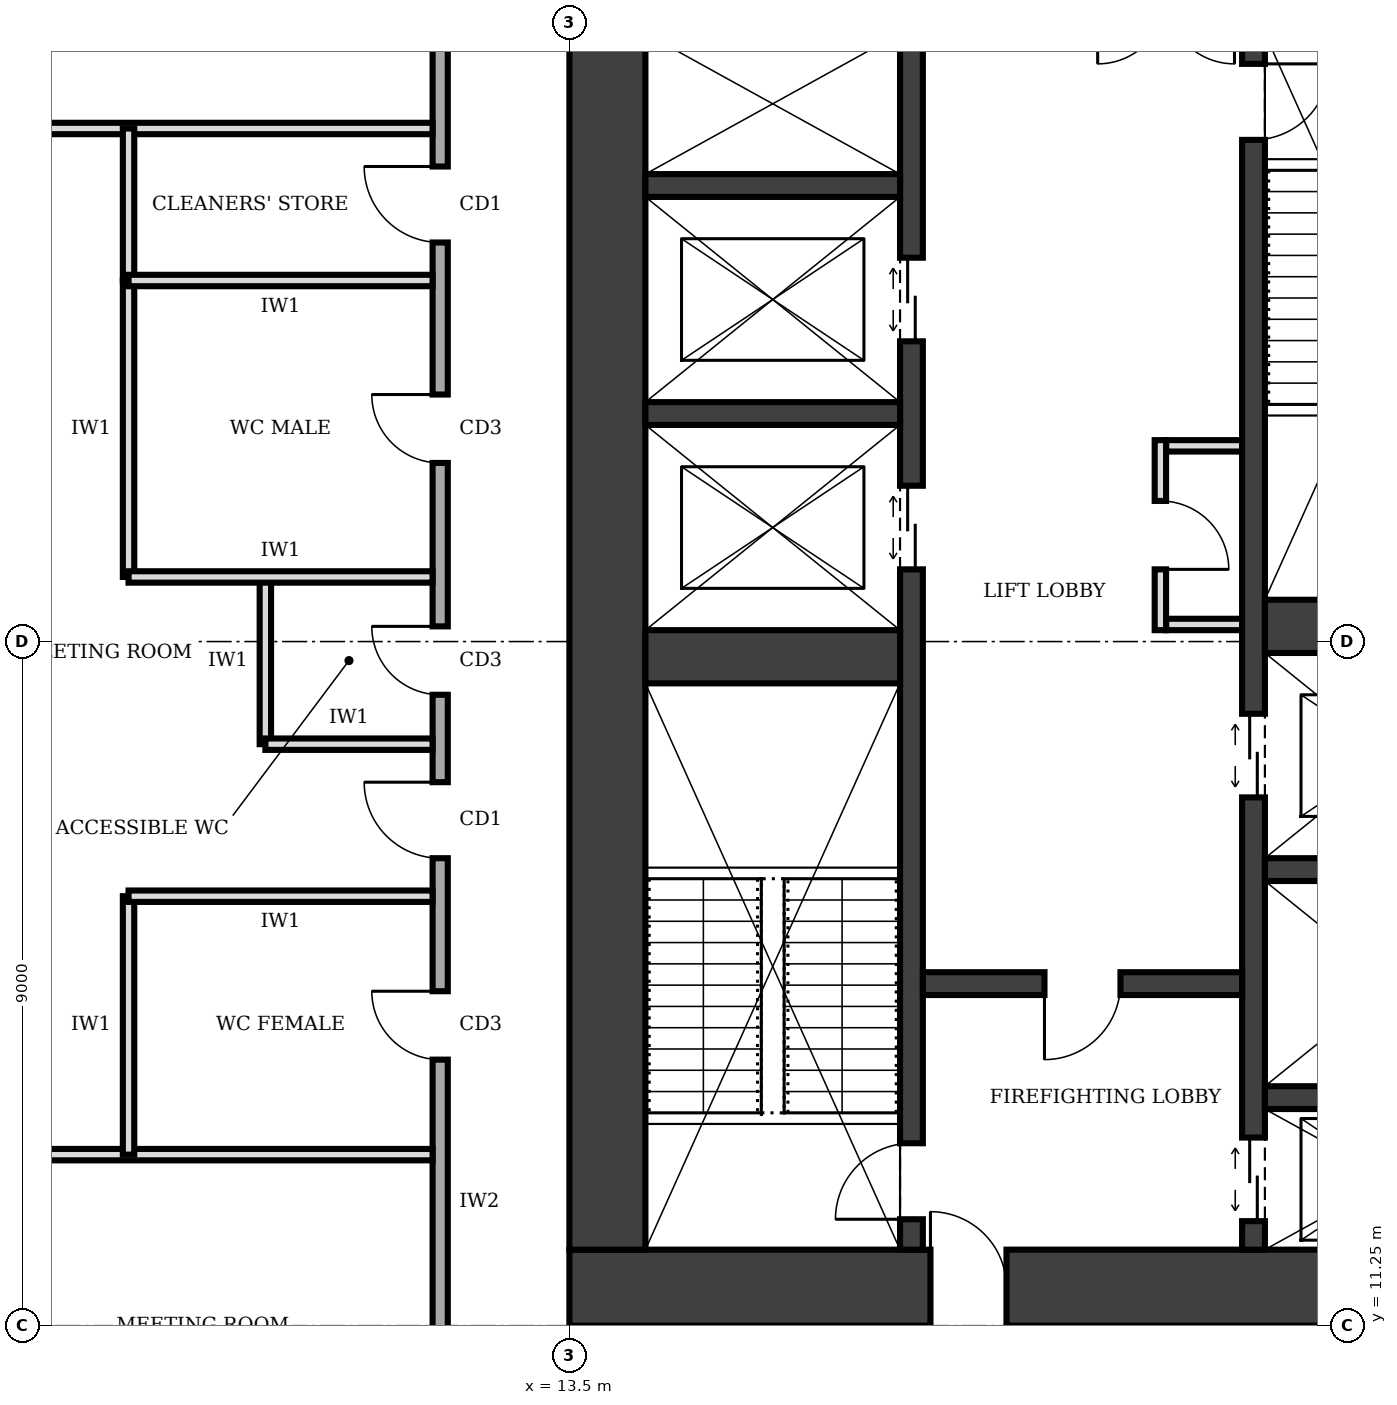
"""IFC4 building model, lengths in metres.
Left out: names, types, materials, properties, quantities, classifications, styles, units other than length and angle.
Written with IfcOpenShell. Run it as: python <this file> out.ifc"""

import sys

from ifc_helpers import new_model, si_unit, direction, frame, frame_2d, origin, place, context, subcontext, project, spatial, rectangle, extrude, element, fill, save


model = new_model("IFC4")
c1 = context("Model", 3, precision=1e-05, world=origin(), true_north=direction((0.0, 1.0)))
c2 = subcontext(c1, "Body", "Model", "MODEL_VIEW")
j1 = project(units=[si_unit("LENGTHUNIT", "METRE"), si_unit("PLANEANGLEUNIT", "RADIAN")], contexts=[c1])
p1 = place(None, origin())
s1 = spatial("IfcSite", under=j1, at=p1, CompositionType="ELEMENT")
p2 = place(p1, origin())
s2 = spatial("IfcBuilding", under=s1, at=p2, CompositionType="ELEMENT")
p3 = place(p2, frame((0.0, 0.0, 89.0)))
s3 = spatial("IfcBuildingStorey", under=s2, at=p3, CompositionType="ELEMENT", Elevation=89.0)
p4 = place(p3, frame((13.5, 11.75, 0.0), z_axis=(0.0, 0.0, 1.0), x_axis=(1.0, 0.0, 0.0)))
e1 = element("IfcWall", 1, at=p4, inside=s3, PredefinedType="SHEAR", context=c2, shape_type="SweptSolid", body=[
    extrude(rectangle(XDim=13.5, YDim=1.0, at=frame_2d((6.75, 0.0))), origin(), (0.0, 0.0, 1.0), 4.0),
])
p5 = place(p4, frame((4.75, 0.0, 0.0)))
e2 = element("IfcOpeningElement", 2, at=p5, cuts=e1, PredefinedType="OPENING", context=c2, shape_type="SweptSolid", body=[
    extrude(rectangle(XDim=1.0, YDim=2.1, at=frame_2d((0.5, 1.05))), frame((0.0, 0.51, 0.0), z_axis=(0.0, -1.0, 0.0), x_axis=(1.0, 0.0, 0.0)), (0.0, 0.0, 1.0), 1.02),
])
p6 = place(p3, frame((14.0, 28.25, 0.0), z_axis=(0.0, 0.0, 1.0), x_axis=(0.0, -1.0, 0.0)))
e3 = element("IfcWall", 3, at=p6, inside=s3, PredefinedType="SHEAR", context=c2, shape_type="SweptSolid", body=[
    extrude(rectangle(XDim=16.0, YDim=1.0, at=frame_2d((8.0, 0.0))), origin(), (0.0, 0.0, 1.0), 4.0),
])
p7 = place(p3, frame((18.0, 12.25, 0.0), z_axis=(0.0, 0.0, 1.0), x_axis=(0.0, 1.0, 0.0)))
e4 = element("IfcWall", 4, at=p7, inside=s3, PredefinedType="SHEAR", context=c2, shape_type="SweptSolid", body=[
    extrude(rectangle(XDim=16.0, YDim=0.3, at=frame_2d((8.0, 0.0))), origin(), (0.0, 0.0, 1.0), 4.0),
])
p8 = place(p7, frame((0.4, 0.0, 0.0)))
e5 = element("IfcOpeningElement", 5, at=p8, cuts=e4, PredefinedType="OPENING", context=c2, shape_type="SweptSolid", body=[
    extrude(rectangle(XDim=1.0, YDim=2.1, at=frame_2d((0.5, 1.05))), frame((0.0, 0.16, 0.0), z_axis=(0.0, -1.0, 0.0), x_axis=(1.0, 0.0, 0.0)), (0.0, 0.0, 1.0), 0.32),
])
p9 = place(p7, frame((8.95, 0.0, 0.0)))
e6 = element("IfcOpeningElement", 6, at=p9, cuts=e4, PredefinedType="OPENING", context=c2, shape_type="SweptSolid", body=[
    extrude(rectangle(XDim=1.1, YDim=2.1, at=frame_2d((0.55, 1.05))), frame((0.0, 0.16, 0.0), z_axis=(0.0, -1.0, 0.0), x_axis=(1.0, 0.0, 0.0)), (0.0, 0.0, 1.0), 0.32),
])
p10 = place(p7, frame((11.95, 0.0, 0.0)))
e7 = element("IfcOpeningElement", 7, at=p10, cuts=e4, PredefinedType="OPENING", context=c2, shape_type="SweptSolid", body=[
    extrude(rectangle(XDim=1.1, YDim=2.1, at=frame_2d((0.55, 1.05))), frame((0.0, 0.16, 0.0), z_axis=(0.0, -1.0, 0.0), x_axis=(1.0, 0.0, 0.0)), (0.0, 0.0, 1.0), 0.32),
])
p11 = place(p3, frame((22.5, 12.25, 0.0), z_axis=(0.0, 0.0, 1.0), x_axis=(0.0, 1.0, 0.0)))
e8 = element("IfcWall", 8, at=p11, inside=s3, PredefinedType="SHEAR", context=c2, shape_type="SweptSolid", body=[
    extrude(rectangle(XDim=16.0, YDim=0.3, at=frame_2d((8.0, 0.0))), origin(), (0.0, 0.0, 1.0), 4.0),
])
p12 = place(p11, frame((14.6, 0.0, 0.0)))
e9 = element("IfcOpeningElement", 9, at=p12, cuts=e8, PredefinedType="OPENING", context=c2, shape_type="SweptSolid", body=[
    extrude(rectangle(XDim=1.0, YDim=2.1, at=frame_2d((0.5, 1.05))), frame((0.0, 0.16, 0.0), z_axis=(0.0, -1.0, 0.0), x_axis=(1.0, 0.0, 0.0)), (0.0, 0.0, 1.0), 0.32),
])
p13 = place(p11, frame((0.375, 0.0, 0.0)))
e10 = element("IfcOpeningElement", 10, at=p13, cuts=e8, PredefinedType="OPENING", context=c2, shape_type="SweptSolid", body=[
    extrude(rectangle(XDim=1.1, YDim=2.1, at=frame_2d((0.55, 1.05))), frame((0.0, 0.16, 0.0), z_axis=(0.0, -1.0, 0.0), x_axis=(1.0, 0.0, 0.0)), (0.0, 0.0, 1.0), 0.32),
])
p14 = place(p11, frame((5.95, 0.0, 0.0)))
e11 = element("IfcOpeningElement", 11, at=p14, cuts=e8, PredefinedType="OPENING", context=c2, shape_type="SweptSolid", body=[
    extrude(rectangle(XDim=1.1, YDim=2.1, at=frame_2d((0.55, 1.05))), frame((0.0, 0.16, 0.0), z_axis=(0.0, -1.0, 0.0), x_axis=(1.0, 0.0, 0.0)), (0.0, 0.0, 1.0), 0.32),
])
p15 = place(p3, frame((14.5, 20.05, 0.0), z_axis=(0.0, 0.0, 1.0), x_axis=(1.0, 0.0, 0.0)))
e12 = element("IfcWall", 12, at=p15, inside=s3, PredefinedType="SHEAR", context=c2, shape_type="SweptSolid", body=[
    extrude(rectangle(XDim=3.35, YDim=0.7, at=frame_2d((1.675, 0.0))), origin(), (0.0, 0.0, 1.0), 4.0),
])
p16 = place(p3, frame((18.15, 15.75, 0.0), z_axis=(0.0, 0.0, 1.0), x_axis=(1.0, 0.0, 0.0)))
e13 = element("IfcWall", 13, at=p16, inside=s3, PredefinedType="SHEAR", context=c2, shape_type="SweptSolid", body=[
    extrude(rectangle(XDim=4.2, YDim=0.3, at=frame_2d((2.1, 0.0))), origin(), (0.0, 0.0, 1.0), 4.0),
])
p17 = place(p16, frame((1.6, 0.0, 0.0)))
e14 = element("IfcOpeningElement", 14, at=p17, cuts=e13, PredefinedType="OPENING", context=c2, shape_type="SweptSolid", body=[
    extrude(rectangle(XDim=1.0, YDim=2.1, at=frame_2d((0.5, 1.05))), frame((0.0, 0.16, 0.0), z_axis=(0.0, -1.0, 0.0), x_axis=(1.0, 0.0, 0.0)), (0.0, 0.0, 1.0), 0.32),
])
for number, where, z_axis, x_axis in (
    (15, (22.65, 14.25, 0.0), (0.0, 0.0, 1.0), (1.0, 0.0, 0.0)),
    (16, (22.65, 17.25, 0.0), (0.0, 0.0, 1.0), (1.0, 0.0, 0.0)),
):
    element("IfcWall", number, at=place(p3, frame(where, z_axis=z_axis, x_axis=x_axis)), inside=s3, PredefinedType="SHEAR", context=c2, shape_type="SweptSolid", body=[
        extrude(rectangle(XDim=3.35, YDim=0.3, at=frame_2d((1.675, 0.0))), origin(), (0.0, 0.0, 1.0), 4.0),
    ])
p18 = place(p3, frame((22.65, 20.45, 0.0), z_axis=(0.0, 0.0, 1.0), x_axis=(1.0, 0.0, 0.0)))
e17 = element("IfcWall", 17, at=p18, inside=s3, PredefinedType="SHEAR", context=c2, shape_type="SweptSolid", body=[
    extrude(rectangle(XDim=3.35, YDim=0.7, at=frame_2d((1.675, 0.0))), origin(), (0.0, 0.0, 1.0), 4.0),
])
for number, where, z_axis, x_axis in (
    (18, (14.5, 23.25, 0.0), (0.0, 0.0, 1.0), (1.0, 0.0, 0.0)),
    (19, (14.5, 26.25, 0.0), (0.0, 0.0, 1.0), (1.0, 0.0, 0.0)),
):
    element("IfcWall", number, at=place(p3, frame(where, z_axis=z_axis, x_axis=x_axis)), inside=s3, PredefinedType="SHEAR", context=c2, shape_type="SweptSolid", body=[
        extrude(rectangle(XDim=3.35, YDim=0.3, at=frame_2d((1.675, 0.0))), origin(), (0.0, 0.0, 1.0), 4.0),
    ])
p19 = place(p3, frame((21.275, 20.4, 0.0), z_axis=(0.0, 0.0, 1.0), x_axis=(0.0, 1.0, 0.0)))
e20 = element("IfcWall", 20, at=p19, inside=s3, PredefinedType="PARTITIONING", context=c2, shape_type="SweptSolid", body=[
    extrude(rectangle(XDim=2.5, YDim=0.15, at=frame_2d((1.25, 0.0))), origin(), (0.0, 0.0, 1.0), 3.75),
])
p20 = place(p19, frame((0.8, 0.0, 0.0)))
e21 = element("IfcOpeningElement", 21, at=p20, cuts=e20, PredefinedType="OPENING", context=c2, shape_type="SweptSolid", body=[
    extrude(rectangle(XDim=0.9, YDim=2.1, at=frame_2d((0.45, 1.05))), frame((0.0, 0.085, 0.0), z_axis=(0.0, -1.0, 0.0), x_axis=(1.0, 0.0, 0.0)), (0.0, 0.0, 1.0), 0.17),
])
for number, where, z_axis, x_axis in (
    (22, (21.35, 20.475, 0.0), (0.0, 0.0, 1.0), (1.0, 0.0, 0.0)),
    (23, (21.35, 22.825, 0.0), (0.0, 0.0, 1.0), (1.0, 0.0, 0.0)),
):
    element("IfcWall", number, at=place(p3, frame(where, z_axis=z_axis, x_axis=x_axis)), inside=s3, PredefinedType="PARTITIONING", context=c2, shape_type="SweptSolid", body=[
        extrude(rectangle(XDim=1.0, YDim=0.15, at=frame_2d((0.5, 0.0))), origin(), (0.0, 0.0, 1.0), 3.75),
    ])
p21 = place(p3, frame((11.8, 32.8, 0.0), z_axis=(0.0, 0.0, 1.0), x_axis=(0.0, -1.0, 0.0)))
e24 = element("IfcWall", 24, at=p21, inside=s3, PredefinedType="SOLIDWALL", context=c2, shape_type="SweptSolid", body=[
    extrude(rectangle(XDim=25.3, YDim=0.2, at=frame_2d((12.65, 0.0))), origin(), (0.0, 0.0, 1.0), 3.75),
])
p22 = place(p21, frame((21.8, 0.0, 0.0)))
e25 = element("IfcOpeningElement", 25, at=p22, cuts=e24, PredefinedType="OPENING", context=c2, shape_type="SweptSolid", body=[
    extrude(rectangle(XDim=1.0, YDim=2.1, at=frame_2d((0.5, 1.05))), frame((0.0, 0.11, 0.0), z_axis=(0.0, -1.0, 0.0), x_axis=(1.0, 0.0, 0.0)), (0.0, 0.0, 1.0), 0.22),
])
p23 = place(p21, frame((17.15, 0.0, 0.0)))
e26 = element("IfcOpeningElement", 26, at=p23, cuts=e24, PredefinedType="OPENING", context=c2, shape_type="SweptSolid", body=[
    extrude(rectangle(XDim=0.9, YDim=2.1, at=frame_2d((0.45, 1.05))), frame((0.0, 0.11, 0.0), z_axis=(0.0, -1.0, 0.0), x_axis=(1.0, 0.0, 0.0)), (0.0, 0.0, 1.0), 0.22),
])
p24 = place(p21, frame((12.35, 0.0, 0.0)))
e27 = element("IfcOpeningElement", 27, at=p24, cuts=e24, PredefinedType="OPENING", context=c2, shape_type="SweptSolid", body=[
    extrude(rectangle(XDim=0.9, YDim=2.1, at=frame_2d((0.45, 1.05))), frame((0.0, 0.11, 0.0), z_axis=(0.0, -1.0, 0.0), x_axis=(1.0, 0.0, 0.0)), (0.0, 0.0, 1.0), 0.22),
])
p25 = place(p21, frame((9.3, 0.0, 0.0)))
e28 = element("IfcOpeningElement", 28, at=p25, cuts=e24, PredefinedType="OPENING", context=c2, shape_type="SweptSolid", body=[
    extrude(rectangle(XDim=0.9, YDim=2.1, at=frame_2d((0.45, 1.05))), frame((0.0, 0.11, 0.0), z_axis=(0.0, -1.0, 0.0), x_axis=(1.0, 0.0, 0.0)), (0.0, 0.0, 1.0), 0.22),
])
p26 = place(p21, frame((6.3, 0.0, 0.0)))
e29 = element("IfcOpeningElement", 29, at=p26, cuts=e24, PredefinedType="OPENING", context=c2, shape_type="SweptSolid", body=[
    extrude(rectangle(XDim=1.0, YDim=2.1, at=frame_2d((0.5, 1.05))), frame((0.0, 0.11, 0.0), z_axis=(0.0, -1.0, 0.0), x_axis=(1.0, 0.0, 0.0)), (0.0, 0.0, 1.0), 0.22),
])
p27 = place(p21, frame((14.4, 0.0, 0.0)))
e30 = element("IfcOpeningElement", 30, at=p27, cuts=e24, PredefinedType="OPENING", context=c2, shape_type="SweptSolid", body=[
    extrude(rectangle(XDim=1.0, YDim=2.1, at=frame_2d((0.5, 1.05))), frame((0.0, 0.11, 0.0), z_axis=(0.0, -1.0, 0.0), x_axis=(1.0, 0.0, 0.0)), (0.0, 0.0, 1.0), 0.22),
])
p28 = place(p21, frame((2.3, 0.0, 0.0)))
e31 = element("IfcOpeningElement", 31, at=p28, cuts=e24, PredefinedType="OPENING", context=c2, shape_type="SweptSolid", body=[
    extrude(rectangle(XDim=1.0, YDim=2.1, at=frame_2d((0.5, 1.05))), frame((0.0, 0.11, 0.0), z_axis=(0.0, -1.0, 0.0), x_axis=(1.0, 0.0, 0.0)), (0.0, 0.0, 1.0), 0.22),
])
for number, where, z_axis, x_axis in (
    (32, (0.3, 13.5, 0.0), (0.0, 0.0, 1.0), (1.0, 0.0, 0.0)),
    (33, (0.3, 27.0, 0.0), (0.0, 0.0, 1.0), (1.0, 0.0, 0.0)),
):
    element("IfcWall", number, at=place(p3, frame(where, z_axis=z_axis, x_axis=x_axis)), inside=s3, PredefinedType="PARTITIONING", context=c2, shape_type="SweptSolid", body=[
        extrude(rectangle(XDim=11.4, YDim=0.15, at=frame_2d((5.7, 0.0))), origin(), (0.0, 0.0, 1.0), 3.75),
    ])
p29 = place(p3, frame((11.7, 16.9, 0.0), z_axis=(0.0, 0.0, 1.0), x_axis=(-1.0, 0.0, 0.0)))
e34 = element("IfcWall", 34, at=p29, inside=s3, PredefinedType="PARTITIONING", context=c2, shape_type="SweptSolid", body=[
    extrude(rectangle(XDim=4.0, YDim=0.15, at=frame_2d((2.0, 0.0))), origin(), (0.0, 0.0, 1.0), 3.75),
])
p30 = place(p3, frame((11.7, 18.9, 0.0), z_axis=(0.0, 0.0, 1.0), x_axis=(-1.0, 0.0, 0.0)))
e35 = element("IfcWall", 35, at=p30, inside=s3, PredefinedType="PARTITIONING", context=c2, shape_type="SweptSolid", body=[
    extrude(rectangle(XDim=2.2, YDim=0.15, at=frame_2d((1.1, 0.0))), origin(), (0.0, 0.0, 1.0), 3.75),
])
p31 = place(p3, frame((11.7, 21.1, 0.0), z_axis=(0.0, 0.0, 1.0), x_axis=(-1.0, 0.0, 0.0)))
e36 = element("IfcWall", 36, at=p31, inside=s3, PredefinedType="PARTITIONING", context=c2, shape_type="SweptSolid", body=[
    extrude(rectangle(XDim=4.0, YDim=0.15, at=frame_2d((2.0, 0.0))), origin(), (0.0, 0.0, 1.0), 2.85),
])
p32 = place(p3, frame((11.7, 25.0, 0.0), z_axis=(0.0, 0.0, 1.0), x_axis=(-1.0, 0.0, 0.0)))
e37 = element("IfcWall", 37, at=p32, inside=s3, PredefinedType="PARTITIONING", context=c2, shape_type="SweptSolid", body=[
    extrude(rectangle(XDim=4.0, YDim=0.15, at=frame_2d((2.0, 0.0))), origin(), (0.0, 0.0, 1.0), 3.75),
])
p33 = place(p3, frame((7.7, 13.5, 0.0), z_axis=(0.0, 0.0, 1.0), x_axis=(0.0, 1.0, 0.0)))
e38 = element("IfcWall", 38, at=p33, inside=s3, PredefinedType="PARTITIONING", context=c2, shape_type="SweptSolid", body=[
    extrude(rectangle(XDim=3.4, YDim=0.15, at=frame_2d((1.7, 0.0))), origin(), (0.0, 0.0, 1.0), 3.75),
])
p34 = place(p3, frame((9.5, 18.9, 0.0), z_axis=(0.0, 0.0, 1.0), x_axis=(0.0, 1.0, 0.0)))
e39 = element("IfcWall", 39, at=p34, inside=s3, PredefinedType="PARTITIONING", context=c2, shape_type="SweptSolid", body=[
    extrude(rectangle(XDim=2.2, YDim=0.15, at=frame_2d((1.1, 0.0))), origin(), (0.0, 0.0, 1.0), 3.75),
])
p35 = place(p3, frame((7.7, 21.1, 0.0), z_axis=(0.0, 0.0, 1.0), x_axis=(0.0, 1.0, 0.0)))
e40 = element("IfcWall", 40, at=p35, inside=s3, PredefinedType="PARTITIONING", context=c2, shape_type="SweptSolid", body=[
    extrude(rectangle(XDim=3.9, YDim=0.15, at=frame_2d((1.95, 0.0))), origin(), (0.0, 0.0, 1.0), 3.75),
])
p36 = place(p3, frame((7.7, 25.0, 0.0), z_axis=(0.0, 0.0, 1.0), x_axis=(0.0, 1.0, 0.0)))
e41 = element("IfcWall", 41, at=p36, inside=s3, PredefinedType="PARTITIONING", context=c2, shape_type="SweptSolid", body=[
    extrude(rectangle(XDim=2.0, YDim=0.15, at=frame_2d((1.0, 0.0))), origin(), (0.0, 0.0, 1.0), 3.75),
])
p37 = place(p5, origin())
e42 = element("IfcDoor", 42, at=p37, inside=s3, OperationType="SINGLE_SWING_LEFT", PredefinedType="DOOR", context=c2, shape_type="SweptSolid", body=[
    extrude(rectangle(XDim=1.0, YDim=2.1, at=frame_2d((0.5, 1.05))), frame((0.0, 0.025, 0.0), z_axis=(0.0, -1.0, 0.0), x_axis=(1.0, 0.0, 0.0)), (0.0, 0.0, 1.0), 0.05),
])
fill(e2, e42)
p38 = place(p17, frame((1.0, 0.0, 0.0), z_axis=(0.0, 0.0, 1.0), x_axis=(-1.0, 0.0, 0.0)))
e43 = element("IfcDoor", 43, at=p38, inside=s3, OperationType="SINGLE_SWING_RIGHT", PredefinedType="DOOR", context=c2, shape_type="SweptSolid", body=[
    extrude(rectangle(XDim=1.0, YDim=2.1, at=frame_2d((0.5, 1.05))), frame((0.0, 0.025, 0.0), z_axis=(0.0, -1.0, 0.0), x_axis=(1.0, 0.0, 0.0)), (0.0, 0.0, 1.0), 0.05),
])
fill(e14, e43)
p39 = place(p8, origin())
e44 = element("IfcDoor", 44, at=p39, inside=s3, OperationType="SINGLE_SWING_LEFT", PredefinedType="DOOR", context=c2, shape_type="SweptSolid", body=[
    extrude(rectangle(XDim=1.0, YDim=2.1, at=frame_2d((0.5, 1.05))), frame((0.0, 0.025, 0.0), z_axis=(0.0, -1.0, 0.0), x_axis=(1.0, 0.0, 0.0)), (0.0, 0.0, 1.0), 0.05),
])
fill(e5, e44)
p40 = place(p12, frame((1.0, 0.0, 0.0), z_axis=(0.0, 0.0, 1.0), x_axis=(-1.0, 0.0, 0.0)))
e45 = element("IfcDoor", 45, at=p40, inside=s3, OperationType="SINGLE_SWING_LEFT", PredefinedType="DOOR", context=c2, shape_type="SweptSolid", body=[
    extrude(rectangle(XDim=1.0, YDim=2.1, at=frame_2d((0.5, 1.05))), frame((0.0, 0.025, 0.0), z_axis=(0.0, -1.0, 0.0), x_axis=(1.0, 0.0, 0.0)), (0.0, 0.0, 1.0), 0.05),
])
fill(e9, e45)
p41 = place(p13, origin())
e46 = element("IfcDoor", 46, at=p41, inside=s3, OperationType="DOUBLE_DOOR_SLIDING", PredefinedType="DOOR", context=c2, shape_type="SweptSolid", body=[
    extrude(rectangle(XDim=1.1, YDim=2.1, at=frame_2d((0.55, 1.05))), frame((0.0, 0.025, 0.0), z_axis=(0.0, -1.0, 0.0), x_axis=(1.0, 0.0, 0.0)), (0.0, 0.0, 1.0), 0.05),
])
fill(e10, e46)
p42 = place(p9, origin())
e47 = element("IfcDoor", 47, at=p42, inside=s3, OperationType="DOUBLE_DOOR_SLIDING", PredefinedType="DOOR", context=c2, shape_type="SweptSolid", body=[
    extrude(rectangle(XDim=1.1, YDim=2.1, at=frame_2d((0.55, 1.05))), frame((0.0, 0.025, 0.0), z_axis=(0.0, -1.0, 0.0), x_axis=(1.0, 0.0, 0.0)), (0.0, 0.0, 1.0), 0.05),
])
fill(e6, e47)
p43 = place(p10, origin())
e48 = element("IfcDoor", 48, at=p43, inside=s3, OperationType="DOUBLE_DOOR_SLIDING", PredefinedType="DOOR", context=c2, shape_type="SweptSolid", body=[
    extrude(rectangle(XDim=1.1, YDim=2.1, at=frame_2d((0.55, 1.05))), frame((0.0, 0.025, 0.0), z_axis=(0.0, -1.0, 0.0), x_axis=(1.0, 0.0, 0.0)), (0.0, 0.0, 1.0), 0.05),
])
fill(e7, e48)
p44 = place(p14, origin())
e49 = element("IfcDoor", 49, at=p44, inside=s3, OperationType="DOUBLE_DOOR_SLIDING", PredefinedType="DOOR", context=c2, shape_type="SweptSolid", body=[
    extrude(rectangle(XDim=1.1, YDim=2.1, at=frame_2d((0.55, 1.05))), frame((0.0, 0.025, 0.0), z_axis=(0.0, -1.0, 0.0), x_axis=(1.0, 0.0, 0.0)), (0.0, 0.0, 1.0), 0.05),
])
fill(e11, e49)
p45 = place(p20, frame((0.9, 0.0, 0.0), z_axis=(0.0, 0.0, 1.0), x_axis=(-1.0, 0.0, 0.0)))
e50 = element("IfcDoor", 50, at=p45, inside=s3, OperationType="SINGLE_SWING_RIGHT", PredefinedType="DOOR", context=c2, shape_type="SweptSolid", body=[
    extrude(rectangle(XDim=0.9, YDim=2.1, at=frame_2d((0.45, 1.05))), frame((0.0, 0.025, 0.0), z_axis=(0.0, -1.0, 0.0), x_axis=(1.0, 0.0, 0.0)), (0.0, 0.0, 1.0), 0.05),
])
fill(e21, e50)
p46 = place(p23, frame((0.9, 0.0, 0.0), z_axis=(0.0, 0.0, 1.0), x_axis=(-1.0, 0.0, 0.0)))
e51 = element("IfcDoor", 51, at=p46, inside=s3, OperationType="SINGLE_SWING_RIGHT", PredefinedType="DOOR", context=c2, shape_type="SweptSolid", body=[
    extrude(rectangle(XDim=0.9, YDim=2.1, at=frame_2d((0.45, 1.05))), frame((0.0, 0.025, 0.0), z_axis=(0.0, -1.0, 0.0), x_axis=(1.0, 0.0, 0.0)), (0.0, 0.0, 1.0), 0.05),
])
fill(e26, e51)
p47 = place(p24, frame((0.9, 0.0, 0.0), z_axis=(0.0, 0.0, 1.0), x_axis=(-1.0, 0.0, 0.0)))
e52 = element("IfcDoor", 52, at=p47, inside=s3, OperationType="SINGLE_SWING_RIGHT", PredefinedType="DOOR", context=c2, shape_type="SweptSolid", body=[
    extrude(rectangle(XDim=0.9, YDim=2.1, at=frame_2d((0.45, 1.05))), frame((0.0, 0.025, 0.0), z_axis=(0.0, -1.0, 0.0), x_axis=(1.0, 0.0, 0.0)), (0.0, 0.0, 1.0), 0.05),
])
fill(e27, e52)
p48 = place(p25, frame((0.9, 0.0, 0.0), z_axis=(0.0, 0.0, 1.0), x_axis=(-1.0, 0.0, 0.0)))
e53 = element("IfcDoor", 53, at=p48, inside=s3, OperationType="SINGLE_SWING_RIGHT", PredefinedType="DOOR", context=c2, shape_type="SweptSolid", body=[
    extrude(rectangle(XDim=0.9, YDim=2.1, at=frame_2d((0.45, 1.05))), frame((0.0, 0.025, 0.0), z_axis=(0.0, -1.0, 0.0), x_axis=(1.0, 0.0, 0.0)), (0.0, 0.0, 1.0), 0.05),
])
fill(e28, e53)
p49 = place(p26, frame((1.0, 0.0, 0.0), z_axis=(0.0, 0.0, 1.0), x_axis=(-1.0, 0.0, 0.0)))
e54 = element("IfcDoor", 54, at=p49, inside=s3, OperationType="SINGLE_SWING_RIGHT", PredefinedType="DOOR", context=c2, shape_type="SweptSolid", body=[
    extrude(rectangle(XDim=1.0, YDim=2.1, at=frame_2d((0.5, 1.05))), frame((0.0, 0.025, 0.0), z_axis=(0.0, -1.0, 0.0), x_axis=(1.0, 0.0, 0.0)), (0.0, 0.0, 1.0), 0.05),
])
fill(e29, e54)
p50 = place(p27, frame((1.0, 0.0, 0.0), z_axis=(0.0, 0.0, 1.0), x_axis=(-1.0, 0.0, 0.0)))
e55 = element("IfcDoor", 55, at=p50, inside=s3, OperationType="SINGLE_SWING_RIGHT", PredefinedType="DOOR", context=c2, shape_type="SweptSolid", body=[
    extrude(rectangle(XDim=1.0, YDim=2.1, at=frame_2d((0.5, 1.05))), frame((0.0, 0.025, 0.0), z_axis=(0.0, -1.0, 0.0), x_axis=(1.0, 0.0, 0.0)), (0.0, 0.0, 1.0), 0.05),
])
fill(e30, e55)
save(model, sys.argv[1])
